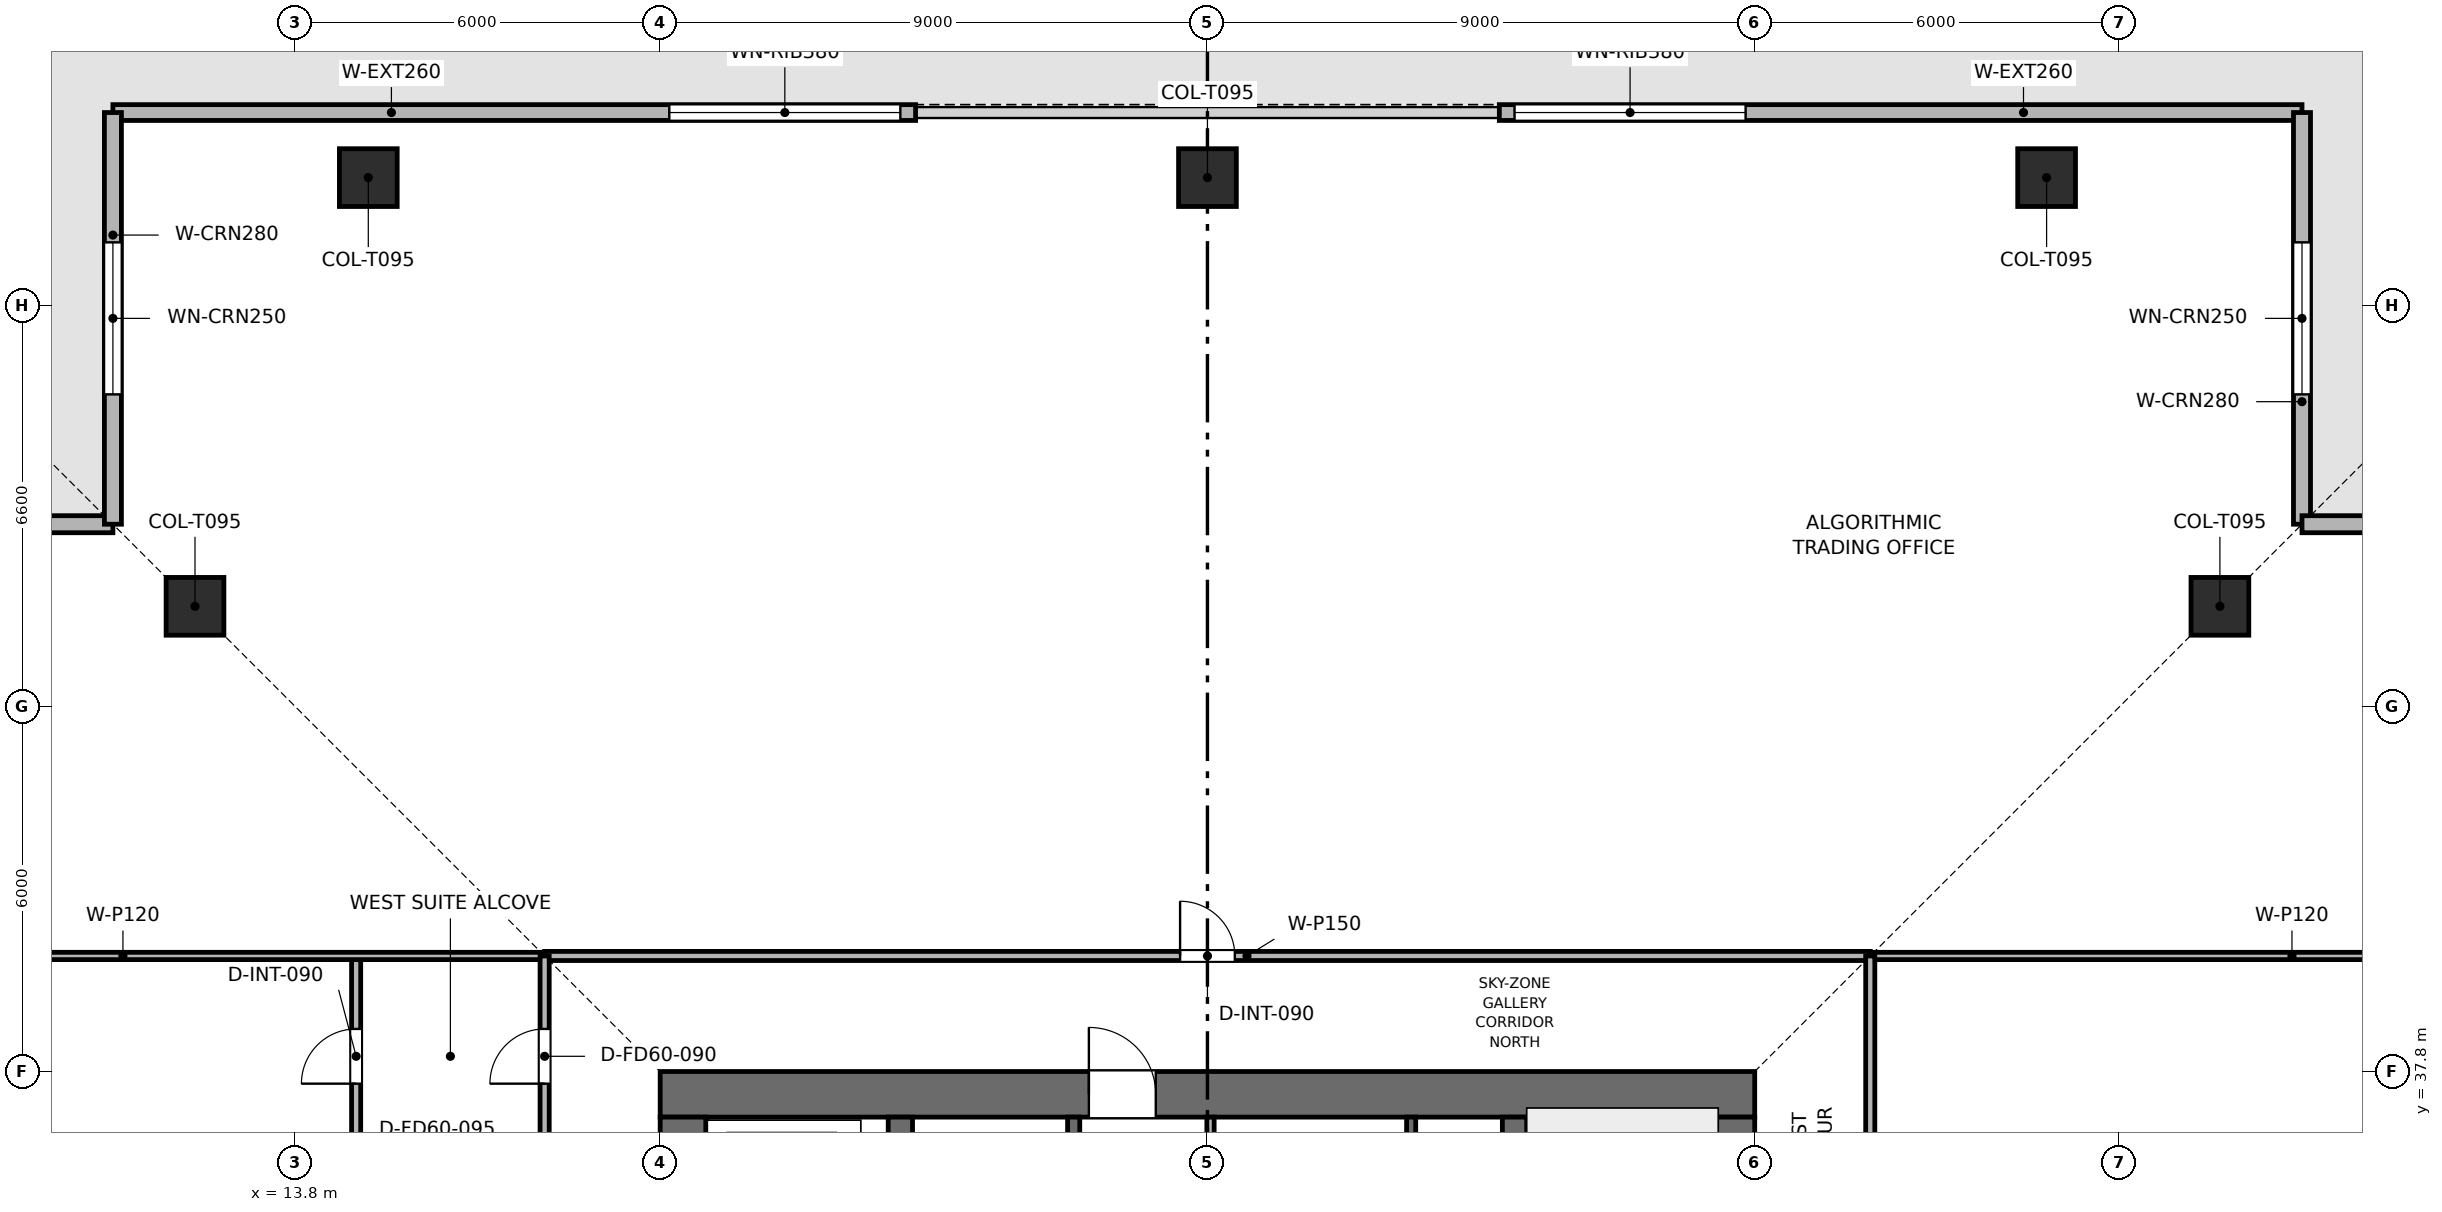
"""IFC4 building model, lengths in metres.
Left out: names, types, materials, properties, quantities, classifications, styles, units other than length and angle.
Written with IfcOpenShell. Run it as: python <this file> out.ifc"""

import sys

from ifc_helpers import new_model, si_unit, direction, frame, frame_2d, origin, origin_2d, place, context, subcontext, project, spatial, rectangle, extrude, element, fill, save


model = new_model("IFC4")
c1 = context("Model", 3, precision=1e-05, world=origin(), true_north=direction((0.0, 1.0)))
c2 = subcontext(c1, "Body", "Model", "MODEL_VIEW")
j1 = project(units=[si_unit("LENGTHUNIT", "METRE"), si_unit("PLANEANGLEUNIT", "RADIAN")], contexts=[c1])
p1 = place(None, origin())
s1 = spatial("IfcSite", under=j1, at=p1, CompositionType="ELEMENT")
p2 = place(p1, origin())
s2 = spatial("IfcBuilding", under=s1, at=p2, CompositionType="ELEMENT")
p3 = place(p2, frame((0.0, 0.0, 246.6)))
s3 = spatial("IfcBuildingStorey", under=s2, at=p3, CompositionType="ELEMENT", Elevation=246.6)
p4 = place(p3, frame((19.8, 37.425, 0.0), z_axis=(0.0, 0.0, 1.0), x_axis=(1.0, 0.0, 0.0)))
e1 = element("IfcWall", 1, at=p4, inside=s3, PredefinedType="SHEAR", context=c2, shape_type="SweptSolid", body=[
    extrude(rectangle(XDim=18.0, YDim=0.75, at=frame_2d((9.0, 0.0))), origin(), (0.0, 0.0, 1.0), 3.75),
])
p5 = place(p4, frame((7.05, 0.0, 0.0)))
e2 = element("IfcOpeningElement", 2, at=p5, cuts=e1, PredefinedType="OPENING", context=c2, shape_type="SweptSolid", body=[
    extrude(rectangle(XDim=1.1, YDim=2.15, at=frame_2d((0.55, 1.075))), frame((0.0, 0.385, 0.0), z_axis=(0.0, -1.0, 0.0), x_axis=(1.0, 0.0, 0.0)), (0.0, 0.0, 1.0), 0.77),
])
p6 = place(p3, frame((20.175, 20.55, 0.0), z_axis=(0.0, 0.0, 1.0), x_axis=(0.0, 1.0, 0.0)))
e3 = element("IfcWall", 3, at=p6, inside=s3, PredefinedType="SHEAR", context=c2, shape_type="SweptSolid", body=[
    extrude(rectangle(XDim=16.5, YDim=0.75, at=frame_2d((8.25, 0.0))), origin(), (0.0, 0.0, 1.0), 3.75),
])
p7 = place(p6, frame((10.25, 0.0, 0.0)))
e4 = element("IfcOpeningElement", 4, at=p7, cuts=e3, PredefinedType="OPENING", context=c2, shape_type="SweptSolid", body=[
    extrude(rectangle(XDim=1.1, YDim=2.15, at=frame_2d((0.55, 1.075))), frame((0.0, 0.385, 0.0), z_axis=(0.0, -1.0, 0.0), x_axis=(1.0, 0.0, 0.0)), (0.0, 0.0, 1.0), 0.77),
])
p8 = place(p3, frame((37.425, 20.55, 0.0), z_axis=(0.0, 0.0, 1.0), x_axis=(0.0, 1.0, 0.0)))
e5 = element("IfcWall", 5, at=p8, inside=s3, PredefinedType="SHEAR", context=c2, shape_type="SweptSolid", body=[
    extrude(rectangle(XDim=16.5, YDim=0.75, at=frame_2d((8.25, 0.0))), origin(), (0.0, 0.0, 1.0), 3.75),
])
p9 = place(p8, frame((4.75, 0.0, 0.0)))
e6 = element("IfcOpeningElement", 6, at=p9, cuts=e5, PredefinedType="OPENING", context=c2, shape_type="SweptSolid", body=[
    extrude(rectangle(XDim=1.1, YDim=2.15, at=frame_2d((0.55, 1.075))), frame((0.0, 0.385, 0.0), z_axis=(0.0, -1.0, 0.0), x_axis=(1.0, 0.0, 0.0)), (0.0, 0.0, 1.0), 0.77),
])
for number, where, z_axis, x_axis in (
    (7, (23.75, 20.55, 0.0), (0.0, 0.0, 1.0), (0.0, 1.0, 0.0)),
    (8, (33.85, 20.55, 0.0), (0.0, 0.0, 1.0), (0.0, 1.0, 0.0)),
):
    element("IfcWall", number, at=place(p3, frame(where, z_axis=z_axis, x_axis=x_axis)), inside=s3, PredefinedType="SHEAR", context=c2, shape_type="SweptSolid", body=[
        extrude(rectangle(XDim=16.5, YDim=0.4, at=frame_2d((8.25, 0.0))), origin(), (0.0, 0.0, 1.0), 3.75),
    ])
for number, where, z_axis, x_axis in (
    (9, (42.6, 52.5, 0.003), (0.0, 0.0, 1.0), (1.0, 0.0, 0.0)),
    (10, (28.8, 52.5, 0.003), (0.0, 0.0, 1.0), (1.0, 0.0, 0.0)),
    (11, (15.0, 52.5, 0.003), (0.0, 0.0, 1.0), (1.0, 0.0, 0.0)),
    (12, (45.45, 45.45, 0.003), (0.0, 0.0, 1.0), (1.0, 0.0, 0.0)),
    (13, (12.15, 45.45, 0.003), (0.0, 0.0, 1.0), (1.0, 0.0, 0.0)),
):
    element("IfcColumn", number, at=place(p3, frame(where, z_axis=z_axis, x_axis=x_axis)), inside=s3, PredefinedType="COLUMN", context=c2, shape_type="SweptSolid", body=[
        extrude(rectangle(XDim=0.95, YDim=0.95, at=origin_2d()), origin(), (0.0, 0.0, 1.0), 3.494),
    ])
p10 = place(p3, frame((10.8, 53.57, 0.0), z_axis=(0.0, 0.0, 1.0), x_axis=(1.0, 0.0, 0.0)))
e14 = element("IfcWall", 14, at=p10, inside=s3, PredefinedType="SOLIDWALL", context=c2, shape_type="SweptSolid", body=[
    extrude(rectangle(XDim=13.2, YDim=0.26, at=frame_2d((6.6, 0.0))), origin(), (0.0, 0.0, 1.0), 3.5),
])
p11 = place(p10, frame((9.15, 0.0, 0.9)))
e15 = element("IfcOpeningElement", 15, at=p11, cuts=e14, PredefinedType="OPENING", context=c2, shape_type="SweptSolid", body=[
    extrude(rectangle(XDim=3.8, YDim=1.9, at=frame_2d((1.9, 0.95))), frame((0.0, 0.14, 0.0), z_axis=(0.0, -1.0, 0.0), x_axis=(1.0, 0.0, 0.0)), (0.0, 0.0, 1.0), 0.28),
])
p12 = place(p3, frame((33.6, 53.57, 0.0), z_axis=(0.0, 0.0, 1.0), x_axis=(1.0, 0.0, 0.0)))
e16 = element("IfcWall", 16, at=p12, inside=s3, PredefinedType="SOLIDWALL", context=c2, shape_type="SweptSolid", body=[
    extrude(rectangle(XDim=13.2, YDim=0.26, at=frame_2d((6.6, 0.0))), origin(), (0.0, 0.0, 1.0), 3.5),
])
p13 = place(p12, frame((0.25, 0.0, 0.9)))
e17 = element("IfcOpeningElement", 17, at=p13, cuts=e16, PredefinedType="OPENING", context=c2, shape_type="SweptSolid", body=[
    extrude(rectangle(XDim=3.8, YDim=1.9, at=frame_2d((1.9, 0.95))), frame((0.0, 0.14, 0.0), z_axis=(0.0, -1.0, 0.0), x_axis=(1.0, 0.0, 0.0)), (0.0, 0.0, 1.0), 0.28),
])
p14 = place(p3, frame((4.03, 46.8, 0.0), z_axis=(0.0, 0.0, 1.0), x_axis=(1.0, 0.0, 0.0)))
e18 = element("IfcWall", 18, at=p14, inside=s3, PredefinedType="SOLIDWALL", context=c2, shape_type="SweptSolid", body=[
    extrude(rectangle(XDim=6.77, YDim=0.28, at=frame_2d((3.385, 0.0))), origin(), (0.0, 0.0, 1.0), 3.5),
])
p15 = place(p14, frame((2.135, 0.0, 0.9)))
e19 = element("IfcOpeningElement", 19, at=p15, cuts=e18, PredefinedType="OPENING", context=c2, shape_type="SweptSolid", body=[
    extrude(rectangle(XDim=2.5, YDim=1.9, at=frame_2d((1.25, 0.95))), frame((0.0, 0.15, 0.0), z_axis=(0.0, -1.0, 0.0), x_axis=(1.0, 0.0, 0.0)), (0.0, 0.0, 1.0), 0.3),
])
p16 = place(p3, frame((10.8, 46.8, 0.0), z_axis=(0.0, 0.0, 1.0), x_axis=(0.0, 1.0, 0.0)))
e20 = element("IfcWall", 20, at=p16, inside=s3, PredefinedType="SOLIDWALL", context=c2, shape_type="SweptSolid", body=[
    extrude(rectangle(XDim=6.77, YDim=0.28, at=frame_2d((3.385, 0.0))), origin(), (0.0, 0.0, 1.0), 3.5),
])
p17 = place(p16, frame((2.135, 0.0, 0.9)))
e21 = element("IfcOpeningElement", 21, at=p17, cuts=e20, PredefinedType="OPENING", context=c2, shape_type="SweptSolid", body=[
    extrude(rectangle(XDim=2.5, YDim=1.9, at=frame_2d((1.25, 0.95))), frame((0.0, 0.15, 0.0), z_axis=(0.0, -1.0, 0.0), x_axis=(1.0, 0.0, 0.0)), (0.0, 0.0, 1.0), 0.3),
])
p18 = place(p3, frame((46.8, 53.57, 0.0), z_axis=(0.0, 0.0, 1.0), x_axis=(0.0, -1.0, 0.0)))
e22 = element("IfcWall", 22, at=p18, inside=s3, PredefinedType="SOLIDWALL", context=c2, shape_type="SweptSolid", body=[
    extrude(rectangle(XDim=6.77, YDim=0.28, at=frame_2d((3.385, 0.0))), origin(), (0.0, 0.0, 1.0), 3.5),
])
p19 = place(p18, frame((2.135, 0.0, 0.9)))
e23 = element("IfcOpeningElement", 23, at=p19, cuts=e22, PredefinedType="OPENING", context=c2, shape_type="SweptSolid", body=[
    extrude(rectangle(XDim=2.5, YDim=1.9, at=frame_2d((1.25, 0.95))), frame((0.0, 0.15, 0.0), z_axis=(0.0, -1.0, 0.0), x_axis=(1.0, 0.0, 0.0)), (0.0, 0.0, 1.0), 0.3),
])
p20 = place(p3, frame((46.8, 46.8, 0.0), z_axis=(0.0, 0.0, 1.0), x_axis=(1.0, 0.0, 0.0)))
e24 = element("IfcWall", 24, at=p20, inside=s3, PredefinedType="SOLIDWALL", context=c2, shape_type="SweptSolid", body=[
    extrude(rectangle(XDim=6.77, YDim=0.28, at=frame_2d((3.385, 0.0))), origin(), (0.0, 0.0, 1.0), 3.5),
])
p21 = place(p20, frame((2.135, 0.0, 0.9)))
e25 = element("IfcOpeningElement", 25, at=p21, cuts=e24, PredefinedType="OPENING", context=c2, shape_type="SweptSolid", body=[
    extrude(rectangle(XDim=2.5, YDim=1.9, at=frame_2d((1.25, 0.95))), frame((0.0, 0.15, 0.0), z_axis=(0.0, -1.0, 0.0), x_axis=(1.0, 0.0, 0.0)), (0.0, 0.0, 1.0), 0.3),
])
p22 = place(p3, frame((32.15, 34.0, 0.0), z_axis=(0.0, 0.0, 1.0), x_axis=(0.0, 1.0, 0.0)))
e26 = element("IfcWall", 26, at=p22, inside=s3, PredefinedType="SHEAR", context=c2, shape_type="SweptSolid", body=[
    extrude(rectangle(XDim=3.05, YDim=0.15, at=frame_2d((1.525, 0.0))), origin(), (0.0, 0.0, 1.0), 3.5),
])
p23 = place(p3, frame((26.6, 34.0, 0.0), z_axis=(0.0, 0.0, 1.0), x_axis=(0.0, 1.0, 0.0)))
e27 = element("IfcWall", 27, at=p23, inside=s3, PredefinedType="SHEAR", context=c2, shape_type="SweptSolid", body=[
    extrude(rectangle(XDim=3.05, YDim=0.2, at=frame_2d((1.525, 0.0))), origin(), (0.0, 0.0, 1.0), 3.5),
])
p24 = place(p23, frame((0.75, 0.0, 0.0)))
e28 = element("IfcOpeningElement", 28, at=p24, cuts=e27, PredefinedType="OPENING", context=c2, shape_type="SweptSolid", body=[
    extrude(rectangle(XDim=1.1, YDim=2.15, at=frame_2d((0.55, 1.075))), frame((0.0, 0.11, 0.0), z_axis=(0.0, -1.0, 0.0), x_axis=(1.0, 0.0, 0.0)), (0.0, 0.0, 1.0), 0.22),
])
p25 = place(p3, frame((28.85, 33.925, 0.0), z_axis=(0.0, 0.0, 1.0), x_axis=(0.0, 1.0, 0.0)))
e29 = element("IfcWall", 29, at=p25, inside=s3, PredefinedType="PARTITIONING", context=c2, shape_type="SweptSolid", body=[
    extrude(rectangle(XDim=3.125, YDim=0.12, at=frame_2d((1.562, 0.0))), origin(), (0.0, 0.0, 1.0), 3.5),
])
p26 = place(p25, frame((0.25, 0.0, 0.0)))
e30 = element("IfcOpeningElement", 30, at=p26, cuts=e29, PredefinedType="OPENING", context=c2, shape_type="SweptSolid", body=[
    extrude(rectangle(XDim=0.85, YDim=2.1, at=frame_2d((0.425, 1.05))), frame((0.0, 0.07, 0.0), z_axis=(0.0, -1.0, 0.0), x_axis=(1.0, 0.0, 0.0)), (0.0, 0.0, 1.0), 0.14),
])
p27 = place(p25, frame((1.72, 0.0, 0.0)))
e31 = element("IfcOpeningElement", 31, at=p27, cuts=e29, PredefinedType="OPENING", context=c2, shape_type="SweptSolid", body=[
    extrude(rectangle(XDim=0.85, YDim=2.1, at=frame_2d((0.425, 1.05))), frame((0.0, 0.07, 0.0), z_axis=(0.0, -1.0, 0.0), x_axis=(1.0, 0.0, 0.0)), (0.0, 0.0, 1.0), 0.14),
])
p28 = place(p3, frame((14.8, 28.0, 0.0), z_axis=(0.0, 0.0, 1.0), x_axis=(0.0, 1.0, 0.0)))
e32 = element("IfcWall", 32, at=p28, inside=s3, PredefinedType="PARTITIONING", context=c2, shape_type="SweptSolid", body=[
    extrude(rectangle(XDim=11.7, YDim=0.15, at=frame_2d((5.85, 0.0))), origin(), (0.0, 0.0, 1.0), 3.085),
])
p29 = place(p28, frame((9.6, 0.0, 0.0)))
e33 = element("IfcOpeningElement", 33, at=p29, cuts=e32, PredefinedType="OPENING", context=c2, shape_type="SweptSolid", body=[
    extrude(rectangle(XDim=0.9, YDim=2.1, at=frame_2d((0.45, 1.05))), frame((0.0, 0.085, 0.0), z_axis=(0.0, -1.0, 0.0), x_axis=(1.0, 0.0, 0.0)), (0.0, 0.0, 1.0), 0.17),
])
p30 = place(p3, frame((4.03, 39.7, 0.0), z_axis=(0.0, 0.0, 1.0), x_axis=(1.0, 0.0, 0.0)))
e34 = element("IfcWall", 34, at=p30, inside=s3, PredefinedType="PARTITIONING", context=c2, shape_type="SweptSolid", body=[
    extrude(rectangle(XDim=13.87, YDim=0.12, at=frame_2d((6.935, 0.0))), origin(), (0.0, 0.0, 1.0), 3.085),
])
p31 = place(p3, frame((39.7, 39.7, 0.0), z_axis=(0.0, 0.0, 1.0), x_axis=(1.0, 0.0, 0.0)))
e35 = element("IfcWall", 35, at=p31, inside=s3, PredefinedType="PARTITIONING", context=c2, shape_type="SweptSolid", body=[
    extrude(rectangle(XDim=13.87, YDim=0.12, at=frame_2d((6.935, 0.0))), origin(), (0.0, 0.0, 1.0), 3.085),
])
p32 = place(p3, frame((17.9, 39.7, 0.0), z_axis=(0.0, 0.0, 1.0), x_axis=(1.0, 0.0, 0.0)))
e36 = element("IfcWall", 36, at=p32, inside=s3, PredefinedType="PARTITIONING", context=c2, shape_type="SweptSolid", body=[
    extrude(rectangle(XDim=21.8, YDim=0.15, at=frame_2d((10.9, 0.0))), origin(), (0.0, 0.0, 1.0), 3.085),
])
p33 = place(p32, frame((10.45, 0.0, 0.0)))
e37 = element("IfcOpeningElement", 37, at=p33, cuts=e36, PredefinedType="OPENING", context=c2, shape_type="SweptSolid", body=[
    extrude(rectangle(XDim=0.9, YDim=2.1, at=frame_2d((0.45, 1.05))), frame((0.0, 0.085, 0.0), z_axis=(0.0, -1.0, 0.0), x_axis=(1.0, 0.0, 0.0)), (0.0, 0.0, 1.0), 0.17),
])
p34 = place(p3, frame((17.9, 10.8, 0.0), z_axis=(0.0, 0.0, 1.0), x_axis=(0.0, 1.0, 0.0)))
e38 = element("IfcWall", 38, at=p34, inside=s3, PredefinedType="PARTITIONING", context=c2, shape_type="SweptSolid", body=[
    extrude(rectangle(XDim=28.9, YDim=0.15, at=frame_2d((14.45, 0.0))), origin(), (0.0, 0.0, 1.0), 3.085),
])
p35 = place(p34, frame((8.15, 0.0, 0.0)))
e39 = element("IfcOpeningElement", 39, at=p35, cuts=e38, PredefinedType="OPENING", context=c2, shape_type="SweptSolid", body=[
    extrude(rectangle(XDim=0.9, YDim=2.1, at=frame_2d((0.45, 1.05))), frame((0.0, 0.085, 0.0), z_axis=(0.0, -1.0, 0.0), x_axis=(1.0, 0.0, 0.0)), (0.0, 0.0, 1.0), 0.17),
])
p36 = place(p34, frame((18.15, 0.0, 0.0)))
e40 = element("IfcOpeningElement", 40, at=p36, cuts=e38, PredefinedType="OPENING", context=c2, shape_type="SweptSolid", body=[
    extrude(rectangle(XDim=0.9, YDim=2.1, at=frame_2d((0.45, 1.05))), frame((0.0, 0.085, 0.0), z_axis=(0.0, -1.0, 0.0), x_axis=(1.0, 0.0, 0.0)), (0.0, 0.0, 1.0), 0.17),
])
p37 = place(p34, frame((21.05, 0.0, 0.0)))
e41 = element("IfcOpeningElement", 41, at=p37, cuts=e38, PredefinedType="OPENING", context=c2, shape_type="SweptSolid", body=[
    extrude(rectangle(XDim=0.9, YDim=2.1, at=frame_2d((0.45, 1.05))), frame((0.0, 0.085, 0.0), z_axis=(0.0, -1.0, 0.0), x_axis=(1.0, 0.0, 0.0)), (0.0, 0.0, 1.0), 0.17),
])
p38 = place(p34, frame((23.8, 0.0, 0.0)))
e42 = element("IfcOpeningElement", 42, at=p38, cuts=e38, PredefinedType="OPENING", context=c2, shape_type="SweptSolid", body=[
    extrude(rectangle(XDim=0.95, YDim=2.1, at=frame_2d((0.475, 1.05))), frame((0.0, 0.085, 0.0), z_axis=(0.0, -1.0, 0.0), x_axis=(1.0, 0.0, 0.0)), (0.0, 0.0, 1.0), 0.17),
])
p39 = place(p34, frame((26.8, 0.0, 0.0)))
e43 = element("IfcOpeningElement", 43, at=p39, cuts=e38, PredefinedType="OPENING", context=c2, shape_type="SweptSolid", body=[
    extrude(rectangle(XDim=0.9, YDim=2.1, at=frame_2d((0.45, 1.05))), frame((0.0, 0.085, 0.0), z_axis=(0.0, -1.0, 0.0), x_axis=(1.0, 0.0, 0.0)), (0.0, 0.0, 1.0), 0.17),
])
p40 = place(p3, frame((39.7, 24.4, 0.0), z_axis=(0.0, 0.0, 1.0), x_axis=(0.0, 1.0, 0.0)))
e44 = element("IfcWall", 44, at=p40, inside=s3, PredefinedType="PARTITIONING", context=c2, shape_type="SweptSolid", body=[
    extrude(rectangle(XDim=15.3, YDim=0.15, at=frame_2d((7.65, 0.0))), origin(), (0.0, 0.0, 1.0), 3.085),
])
p41 = place(p40, frame((7.2, 0.0, 0.0)))
e45 = element("IfcOpeningElement", 45, at=p41, cuts=e44, PredefinedType="OPENING", context=c2, shape_type="SweptSolid", body=[
    extrude(rectangle(XDim=0.9, YDim=2.1, at=frame_2d((0.45, 1.05))), frame((0.0, 0.085, 0.0), z_axis=(0.0, -1.0, 0.0), x_axis=(1.0, 0.0, 0.0)), (0.0, 0.0, 1.0), 0.17),
])
p42 = place(p11, origin())
e46 = element("IfcWindow", 46, at=p42, inside=s3, PartitioningType="SINGLE_PANEL", PredefinedType="WINDOW", context=c2, shape_type="SweptSolid", body=[
    extrude(rectangle(XDim=3.8, YDim=1.9, at=frame_2d((1.9, 0.95))), frame((0.0, 0.03, 0.0), z_axis=(0.0, -1.0, 0.0), x_axis=(1.0, 0.0, 0.0)), (0.0, 0.0, 1.0), 0.06),
])
fill(e15, e46)
p43 = place(p13, origin())
e47 = element("IfcWindow", 47, at=p43, inside=s3, PartitioningType="SINGLE_PANEL", PredefinedType="WINDOW", context=c2, shape_type="SweptSolid", body=[
    extrude(rectangle(XDim=3.8, YDim=1.9, at=frame_2d((1.9, 0.95))), frame((0.0, 0.03, 0.0), z_axis=(0.0, -1.0, 0.0), x_axis=(1.0, 0.0, 0.0)), (0.0, 0.0, 1.0), 0.06),
])
fill(e17, e47)
p44 = place(p17, origin())
e48 = element("IfcWindow", 48, at=p44, inside=s3, PartitioningType="SINGLE_PANEL", PredefinedType="WINDOW", context=c2, shape_type="SweptSolid", body=[
    extrude(rectangle(XDim=2.5, YDim=1.9, at=frame_2d((1.25, 0.95))), frame((0.0, 0.03, 0.0), z_axis=(0.0, -1.0, 0.0), x_axis=(1.0, 0.0, 0.0)), (0.0, 0.0, 1.0), 0.06),
])
fill(e21, e48)
p45 = place(p19, origin())
e49 = element("IfcWindow", 49, at=p45, inside=s3, PartitioningType="SINGLE_PANEL", PredefinedType="WINDOW", context=c2, shape_type="SweptSolid", body=[
    extrude(rectangle(XDim=2.5, YDim=1.9, at=frame_2d((1.25, 0.95))), frame((0.0, 0.03, 0.0), z_axis=(0.0, -1.0, 0.0), x_axis=(1.0, 0.0, 0.0)), (0.0, 0.0, 1.0), 0.06),
])
fill(e23, e49)
p46 = place(p29, origin())
e50 = element("IfcDoor", 50, at=p46, inside=s3, OperationType="SINGLE_SWING_LEFT", PredefinedType="DOOR", context=c2, shape_type="SweptSolid", body=[
    extrude(rectangle(XDim=0.9, YDim=2.1, at=frame_2d((0.45, 1.05))), frame((0.0, 0.025, 0.0), z_axis=(0.0, -1.0, 0.0), x_axis=(1.0, 0.0, 0.0)), (0.0, 0.0, 1.0), 0.05),
])
fill(e33, e50)
p47 = place(p33, origin())
e51 = element("IfcDoor", 51, at=p47, inside=s3, OperationType="SINGLE_SWING_LEFT", PredefinedType="DOOR", context=c2, shape_type="SweptSolid", body=[
    extrude(rectangle(XDim=0.9, YDim=2.1, at=frame_2d((0.45, 1.05))), frame((0.0, 0.025, 0.0), z_axis=(0.0, -1.0, 0.0), x_axis=(1.0, 0.0, 0.0)), (0.0, 0.0, 1.0), 0.05),
])
fill(e37, e51)
p48 = place(p39, origin())
e52 = element("IfcDoor", 52, at=p48, inside=s3, OperationType="SINGLE_SWING_LEFT", PredefinedType="DOOR", context=c2, shape_type="SweptSolid", body=[
    extrude(rectangle(XDim=0.9, YDim=2.1, at=frame_2d((0.45, 1.05))), frame((0.0, 0.025, 0.0), z_axis=(0.0, -1.0, 0.0), x_axis=(1.0, 0.0, 0.0)), (0.0, 0.0, 1.0), 0.05),
])
fill(e43, e52)
p49 = place(p5, origin())
e53 = element("IfcDoor", 53, at=p49, inside=s3, OperationType="SINGLE_SWING_LEFT", PredefinedType="DOOR", context=c2, shape_type="SweptSolid", body=[
    extrude(rectangle(XDim=1.1, YDim=2.15, at=frame_2d((0.55, 1.075))), frame((0.0, 0.025, 0.0), z_axis=(0.0, -1.0, 0.0), x_axis=(1.0, 0.0, 0.0)), (0.0, 0.0, 1.0), 0.05),
])
fill(e2, e53)
save(model, sys.argv[1])
